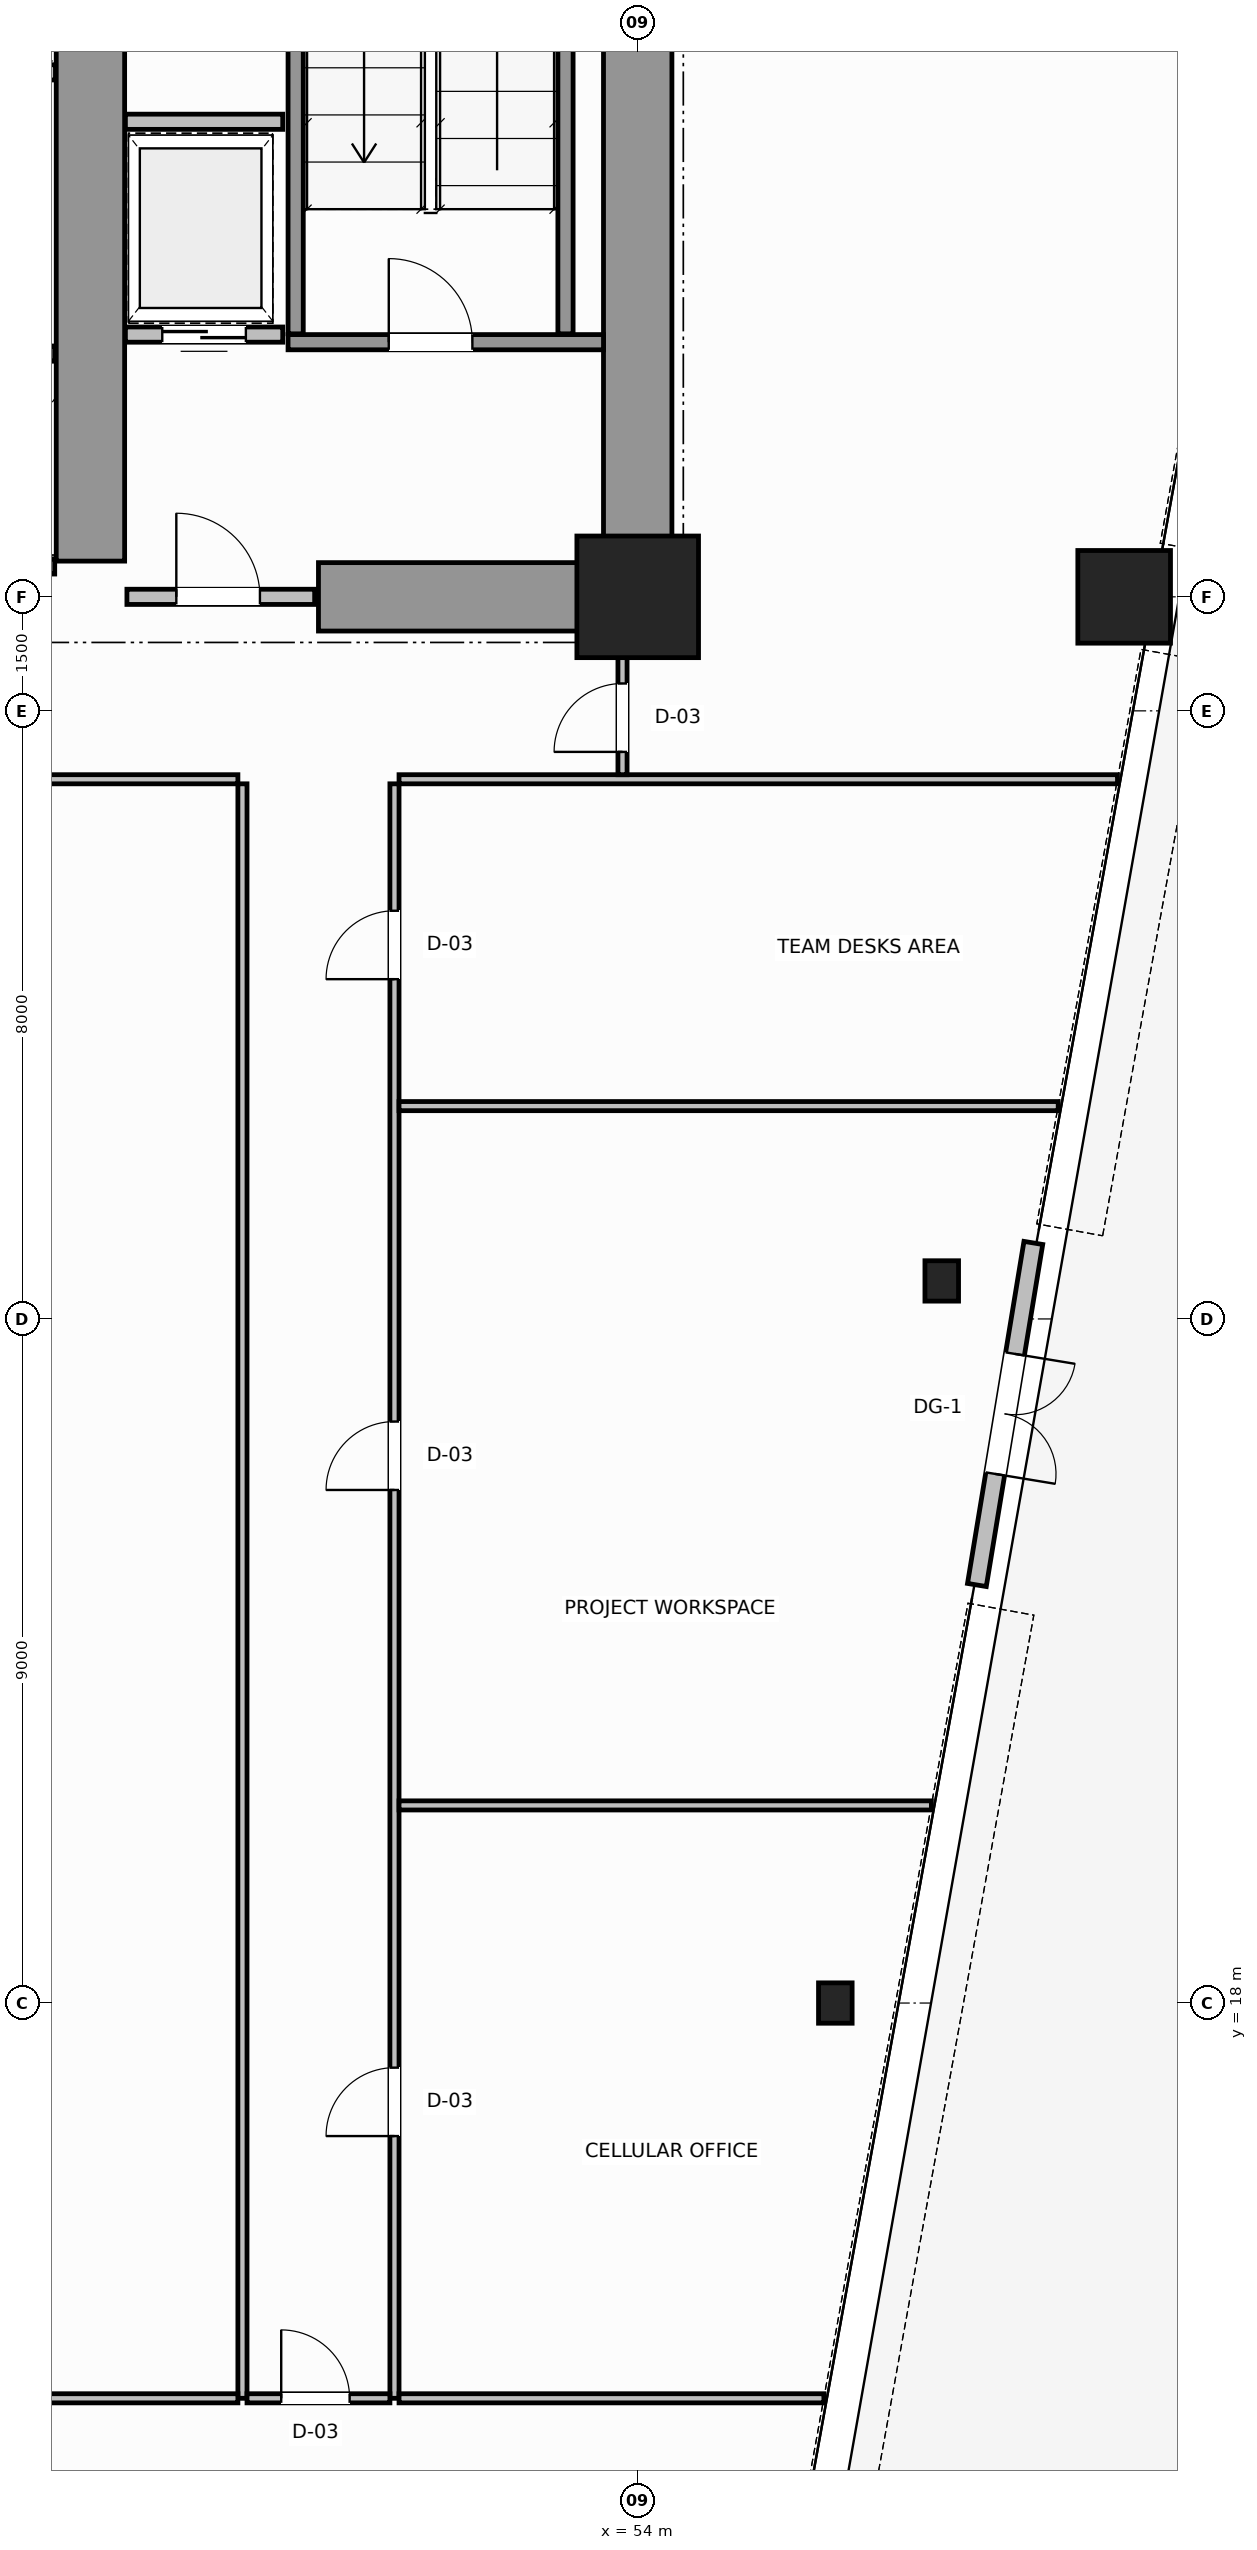
"""IFC4 building model, lengths in metres.
Left out: names, types, materials, properties, quantities, classifications, styles, units other than length and angle.
Written with IfcOpenShell. Run it as: python <this file> out.ifc"""

import sys

from ifc_helpers import new_model, si_unit, direction, frame, frame_2d, origin, origin_2d, place, context, subcontext, project, spatial, rectangle, hollow_circle, i_section, extrude, source, transform, mapped, element, fill, save


model = new_model("IFC4")
c1 = context("Model", 3, precision=1e-05, world=origin(), true_north=direction((0.0, 1.0)))
c2 = subcontext(c1, "Body", "Model", "MODEL_VIEW")
j1 = project(units=[si_unit("LENGTHUNIT", "METRE"), si_unit("PLANEANGLEUNIT", "RADIAN")], contexts=[c1])
p1 = place(None, origin())
s1 = spatial("IfcSite", under=j1, at=p1, CompositionType="ELEMENT")
p2 = place(p1, origin())
s2 = spatial("IfcBuilding", under=s1, at=p2, CompositionType="ELEMENT")
p3 = place(p2, frame((0.0, 0.0, 18.8)))
s3 = spatial("IfcBuildingStorey", under=s2, at=p3, CompositionType="ELEMENT", Elevation=18.8)
m1 = source(origin(), c2, "Body", "SweptSolid", [
    extrude(rectangle(XDim=1.6, YDim=1.6, at=origin_2d()), origin(), (0.0, 0.0, 1.0), 3.8),
])
p4 = place(p3, frame((54.0, 36.5, 0.0), z_axis=(0.0, 0.0, 1.0), x_axis=(1.0, 0.0, 0.0)))
e1 = element("IfcColumn", 1, at=p4, inside=s3, PredefinedType="COLUMN", context=c2, shape_type="MappedRepresentation", body=[
    mapped(m1, transform((0.0, 0.0, 0.0), scale=1.0)),
])
m2 = source(origin(), c2, "Body", "SweptSolid", [
    extrude(hollow_circle(Radius=0.61, WallThickness=0.05, at=origin_2d()), origin(), (0.0, 0.0, 1.0), 3.8),
])
p5 = place(p3, frame((60.4, 36.5, 0.0), z_axis=(0.0, 0.0, 1.0), x_axis=(1.0, 0.0, 0.0)))
e2 = element("IfcColumn", 2, at=p5, inside=s3, PredefinedType="COLUMN", context=c2, shape_type="MappedRepresentation", body=[
    mapped(m2, transform((0.0, 0.0, 0.0), scale=1.0)),
])
m3 = source(origin(), c2, "Body", "SweptSolid", [
    extrude(i_section(OverallWidth=0.442, OverallDepth=0.531, WebThickness=0.065, FlangeThickness=0.076, FilletRadius=0.015, at=origin_2d()), origin(), (0.0, 0.0, 1.0), 3.8),
])
for number, where, z_axis, x_axis in (
    (3, (58.0, 27.5, 0.0), (0.0, 0.0, 1.0), (1.0, 0.0, 0.0)),
    (4, (56.6, 18.0, 0.0), (0.0, 0.0, 1.0), (1.0, 0.0, 0.0)),
):
    element("IfcColumn", number, at=place(p3, frame(where, z_axis=z_axis, x_axis=x_axis)), inside=s3, PredefinedType="COLUMN", context=c2, shape_type="MappedRepresentation", body=[
        mapped(m3, transform((0.0, 0.0, 0.0), scale=1.0)),
    ])
p6 = place(p3, frame((54.0, 36.5, 0.0), z_axis=(0.0, 0.0, 1.0), x_axis=(0.0, 1.0, 0.0)))
e5 = element("IfcWall", 5, at=p6, inside=s3, PredefinedType="SHEAR", context=c2, shape_type="SweptSolid", body=[
    extrude(rectangle(XDim=14.5, YDim=0.9, at=frame_2d((7.25, 0.0))), origin(), (0.0, 0.0, 1.0), 3.8),
])
p7 = place(p3, frame((49.8, 36.5, 0.0), z_axis=(0.0, 0.0, 1.0), x_axis=(1.0, 0.0, 0.0)))
e6 = element("IfcWall", 6, at=p7, inside=s3, PredefinedType="SHEAR", context=c2, shape_type="SweptSolid", body=[
    extrude(rectangle(XDim=3.73, YDim=0.9, at=frame_2d((1.865, 0.0))), origin(), (0.0, 0.0, 1.0), 2.38),
])
p8 = place(p3, frame((46.8, 36.97, 0.0), z_axis=(0.0, 0.0, 1.0), x_axis=(0.0, 1.0, 0.0)))
e7 = element("IfcWall", 7, at=p8, inside=s3, PredefinedType="SHEAR", context=c2, shape_type="SweptSolid", body=[
    extrude(rectangle(XDim=9.23, YDim=0.9, at=frame_2d((4.615, 0.0))), origin(), (0.0, 0.0, 1.0), 3.8),
])
p9 = place(p3, frame((59.205, 28.0, 0.0), z_axis=(0.0, 0.0, 1.0), x_axis=(-0.162836302539, -0.98665309941, 0.0)))
e8 = element("IfcWall", 8, at=p9, inside=s3, PredefinedType="STANDARD", context=c2, shape_type="SweptSolid", body=[
    extrude(rectangle(XDim=4.561, YDim=0.25, at=frame_2d((2.28, 0.0))), origin(), (0.0, 0.0, 1.0), 3.58),
])
p10 = place(p9, frame((1.48, 0.0, 0.0)))
e9 = element("IfcOpeningElement", 9, at=p10, cuts=e8, PredefinedType="OPENING", context=c2, shape_type="SweptSolid", body=[
    extrude(rectangle(XDim=1.6, YDim=2.3, at=frame_2d((0.8, 1.15))), frame((0.0, 0.135, 0.0), z_axis=(0.0, -1.0, 0.0), x_axis=(1.0, 0.0, 0.0)), (0.0, 0.0, 1.0), 0.27),
])
p11 = place(p3, frame((49.4, 39.85, 0.0), z_axis=(0.0, 0.0, 1.0), x_axis=(1.0, 0.0, 0.0)))
e10 = element("IfcWall", 10, at=p11, inside=s3, PredefinedType="SOLIDWALL", context=c2, shape_type="SweptSolid", body=[
    extrude(rectangle(XDim=4.15, YDim=0.2, at=frame_2d((2.075, 0.0))), origin(), (0.0, 0.0, 1.0), 3.8),
])
p12 = place(p11, frame((1.325, 0.0, 0.0)))
e11 = element("IfcOpeningElement", 11, at=p12, cuts=e10, PredefinedType="OPENING", context=c2, shape_type="SweptSolid", body=[
    extrude(rectangle(XDim=1.1, YDim=2.15, at=frame_2d((0.55, 1.075))), frame((0.0, 0.11, 0.0), z_axis=(0.0, -1.0, 0.0), x_axis=(1.0, 0.0, 0.0)), (0.0, 0.0, 1.0), 0.22),
])
for number, where, z_axis, x_axis in (
    (12, (49.5, 39.96, 0.0), (0.0, 0.0, 1.0), (0.0, 1.0, 0.0)),
    (13, (53.05, 39.96, 0.0), (0.0, 0.0, 1.0), (0.0, 1.0, 0.0)),
):
    element("IfcWall", number, at=place(p3, frame(where, z_axis=z_axis, x_axis=x_axis)), inside=s3, PredefinedType="SOLIDWALL", context=c2, shape_type="SweptSolid", body=[
        extrude(rectangle(XDim=9.93, YDim=0.2, at=frame_2d((4.965, 0.0))), origin(), (0.0, 0.0, 1.0), 3.8),
    ])
p13 = place(p3, frame((47.28, 36.5, 0.0), z_axis=(0.0, 0.0, 1.0), x_axis=(1.0, 0.0, 0.0)))
e14 = element("IfcWall", 14, at=p13, inside=s3, PredefinedType="SOLIDWALL", context=c2, shape_type="SweptSolid", body=[
    extrude(rectangle(XDim=2.47, YDim=0.2, at=frame_2d((1.235, 0.0))), origin(), (0.0, 0.0, 1.0), 2.37),
])
p14 = place(p13, frame((0.65, 0.0, 0.0)))
e15 = element("IfcOpeningElement", 15, at=p14, cuts=e14, PredefinedType="OPENING", context=c2, shape_type="SweptSolid", body=[
    extrude(rectangle(XDim=1.1, YDim=2.15, at=frame_2d((0.55, 1.075))), frame((0.0, 0.11, 0.0), z_axis=(0.0, -1.0, 0.0), x_axis=(1.0, 0.0, 0.0)), (0.0, 0.0, 1.0), 0.22),
])
p15 = place(p3, frame((44.37, 39.7, 0.0), z_axis=(0.0, 0.0, 1.0), x_axis=(1.0, 0.0, 0.0)))
e16 = element("IfcWall", 16, at=p15, inside=s3, PredefinedType="SOLIDWALL", context=c2, shape_type="SweptSolid", body=[
    extrude(rectangle(XDim=1.96, YDim=0.2, at=frame_2d((0.98, 0.0))), origin(), (0.0, 0.0, 1.0), 3.58),
])
p16 = place(p3, frame((44.37, 36.9, 0.0), z_axis=(0.0, 0.0, 1.0), x_axis=(1.0, 0.0, 0.0)))
e17 = element("IfcWall", 17, at=p16, inside=s3, PredefinedType="SOLIDWALL", context=c2, shape_type="SweptSolid", body=[
    extrude(rectangle(XDim=1.96, YDim=0.2, at=frame_2d((0.98, 0.0))), origin(), (0.0, 0.0, 1.0), 2.37),
])
p17 = place(p3, frame((44.62, 43.4, 0.0), z_axis=(0.0, 0.0, 1.0), x_axis=(1.0, 0.0, 0.0)))
e18 = element("IfcWall", 18, at=p17, inside=s3, PredefinedType="SOLIDWALL", context=c2, shape_type="SweptSolid", body=[
    extrude(rectangle(XDim=1.72, YDim=0.2, at=frame_2d((0.86, 0.0))), origin(), (0.0, 0.0, 1.0), 3.58),
])
p18 = place(p3, frame((47.26, 39.95, 0.0), z_axis=(0.0, 0.0, 1.0), x_axis=(1.0, 0.0, 0.0)))
e19 = element("IfcWall", 19, at=p18, inside=s3, PredefinedType="SOLIDWALL", context=c2, shape_type="SweptSolid", body=[
    extrude(rectangle(XDim=2.07, YDim=0.2, at=frame_2d((1.035, 0.0))), origin(), (0.0, 0.0, 1.0), 3.58),
])
p19 = place(p18, frame((0.485, 0.0, 0.0)))
e20 = element("IfcOpeningElement", 20, at=p19, cuts=e19, PredefinedType="OPENING", context=c2, shape_type="SweptSolid", body=[
    extrude(rectangle(XDim=1.1, YDim=2.15, at=frame_2d((0.55, 1.075))), frame((0.0, 0.11, 0.0), z_axis=(0.0, -1.0, 0.0), x_axis=(1.0, 0.0, 0.0)), (0.0, 0.0, 1.0), 0.22),
])
p20 = place(p3, frame((47.26, 42.75, 0.0), z_axis=(0.0, 0.0, 1.0), x_axis=(1.0, 0.0, 0.0)))
e21 = element("IfcWall", 21, at=p20, inside=s3, PredefinedType="SOLIDWALL", context=c2, shape_type="SweptSolid", body=[
    extrude(rectangle(XDim=2.07, YDim=0.2, at=frame_2d((1.035, 0.0))), origin(), (0.0, 0.0, 1.0), 3.58),
])
p21 = place(p3, frame((19.26, 34.1, 0.0), z_axis=(0.0, 0.0, 1.0), x_axis=(1.0, 0.0, 0.0)))
e22 = element("IfcWall", 22, at=p21, inside=s3, PredefinedType="PARTITIONING", context=c2, shape_type="SweptSolid", body=[
    extrude(rectangle(XDim=29.48, YDim=0.12, at=frame_2d((14.74, 0.0))), origin(), (0.0, 0.0, 1.0), 3.58),
])
p22 = place(p21, frame((1.49, 0.0, 0.0)))
e23 = element("IfcOpeningElement", 23, at=p22, cuts=e22, PredefinedType="OPENING", context=c2, shape_type="SweptSolid", body=[
    extrude(rectangle(XDim=0.9, YDim=2.15, at=frame_2d((0.45, 1.075))), frame((0.0, 0.07, 0.0), z_axis=(0.0, -1.0, 0.0), x_axis=(1.0, 0.0, 0.0)), (0.0, 0.0, 1.0), 0.14),
])
p23 = place(p21, frame((9.79, 0.0, 0.0)))
e24 = element("IfcOpeningElement", 24, at=p23, cuts=e22, PredefinedType="OPENING", context=c2, shape_type="SweptSolid", body=[
    extrude(rectangle(XDim=0.9, YDim=2.15, at=frame_2d((0.45, 1.075))), frame((0.0, 0.07, 0.0), z_axis=(0.0, -1.0, 0.0), x_axis=(1.0, 0.0, 0.0)), (0.0, 0.0, 1.0), 0.14),
])
p24 = place(p21, frame((22.59, 0.0, 0.0)))
e25 = element("IfcOpeningElement", 25, at=p24, cuts=e22, PredefinedType="OPENING", context=c2, shape_type="SweptSolid", body=[
    extrude(rectangle(XDim=0.9, YDim=2.15, at=frame_2d((0.45, 1.075))), frame((0.0, 0.07, 0.0), z_axis=(0.0, -1.0, 0.0), x_axis=(1.0, 0.0, 0.0)), (0.0, 0.0, 1.0), 0.14),
])
p25 = place(p3, frame((50.86, 34.1, 0.0), z_axis=(0.0, 0.0, 1.0), x_axis=(1.0, 0.0, 0.0)))
e26 = element("IfcWall", 26, at=p25, inside=s3, PredefinedType="PARTITIONING", context=c2, shape_type="SweptSolid", body=[
    extrude(rectangle(XDim=9.452, YDim=0.12, at=frame_2d((4.726, 0.0))), origin(), (0.0, 0.0, 1.0), 3.58),
])
p26 = place(p3, frame((53.8, 34.16, 0.0), z_axis=(0.0, 0.0, 1.0), x_axis=(0.0, 1.0, 0.0)))
e27 = element("IfcWall", 27, at=p26, inside=s3, PredefinedType="PARTITIONING", context=c2, shape_type="SweptSolid", body=[
    extrude(rectangle(XDim=2.28, YDim=0.12, at=frame_2d((1.14, 0.0))), origin(), (0.0, 0.0, 1.0), 3.58),
])
p27 = place(p26, frame((0.3, 0.0, 0.0)))
e28 = element("IfcOpeningElement", 28, at=p27, cuts=e27, PredefinedType="OPENING", context=c2, shape_type="SweptSolid", body=[
    extrude(rectangle(XDim=0.9, YDim=2.15, at=frame_2d((0.45, 1.075))), frame((0.0, 0.07, 0.0), z_axis=(0.0, -1.0, 0.0), x_axis=(1.0, 0.0, 0.0)), (0.0, 0.0, 1.0), 0.14),
])
p28 = place(p3, frame((48.8, 12.8, 0.0), z_axis=(0.0, 0.0, 1.0), x_axis=(0.0, 1.0, 0.0)))
e29 = element("IfcWall", 29, at=p28, inside=s3, PredefinedType="PARTITIONING", context=c2, shape_type="SweptSolid", body=[
    extrude(rectangle(XDim=21.24, YDim=0.12, at=frame_2d((10.62, 0.0))), origin(), (0.0, 0.0, 1.0), 3.58),
])
p29 = place(p3, frame((50.8, 12.8, 0.0), z_axis=(0.0, 0.0, 1.0), x_axis=(0.0, 1.0, 0.0)))
e30 = element("IfcWall", 30, at=p29, inside=s3, PredefinedType="PARTITIONING", context=c2, shape_type="SweptSolid", body=[
    extrude(rectangle(XDim=21.24, YDim=0.12, at=frame_2d((10.62, 0.0))), origin(), (0.0, 0.0, 1.0), 3.58),
])
p30 = place(p29, frame((3.45, 0.0, 0.0)))
e31 = element("IfcOpeningElement", 31, at=p30, cuts=e30, PredefinedType="OPENING", context=c2, shape_type="SweptSolid", body=[
    extrude(rectangle(XDim=0.9, YDim=2.15, at=frame_2d((0.45, 1.075))), frame((0.0, 0.07, 0.0), z_axis=(0.0, -1.0, 0.0), x_axis=(1.0, 0.0, 0.0)), (0.0, 0.0, 1.0), 0.14),
])
p31 = place(p29, frame((11.95, 0.0, 0.0)))
e32 = element("IfcOpeningElement", 32, at=p31, cuts=e30, PredefinedType="OPENING", context=c2, shape_type="SweptSolid", body=[
    extrude(rectangle(XDim=0.9, YDim=2.15, at=frame_2d((0.45, 1.075))), frame((0.0, 0.07, 0.0), z_axis=(0.0, -1.0, 0.0), x_axis=(1.0, 0.0, 0.0)), (0.0, 0.0, 1.0), 0.14),
])
p32 = place(p29, frame((18.67, 0.0, 0.0)))
e33 = element("IfcOpeningElement", 33, at=p32, cuts=e30, PredefinedType="OPENING", context=c2, shape_type="SweptSolid", body=[
    extrude(rectangle(XDim=0.9, YDim=2.15, at=frame_2d((0.45, 1.075))), frame((0.0, 0.07, 0.0), z_axis=(0.0, -1.0, 0.0), x_axis=(1.0, 0.0, 0.0)), (0.0, 0.0, 1.0), 0.14),
])
p33 = place(p3, frame((48.86, 12.8, 0.0), z_axis=(0.0, 0.0, 1.0), x_axis=(1.0, 0.0, 0.0)))
e34 = element("IfcWall", 34, at=p33, inside=s3, PredefinedType="PARTITIONING", context=c2, shape_type="SweptSolid", body=[
    extrude(rectangle(XDim=1.88, YDim=0.12, at=frame_2d((0.94, 0.0))), origin(), (0.0, 0.0, 1.0), 3.58),
])
p34 = place(p33, frame((0.45, 0.0, 0.0)))
e35 = element("IfcOpeningElement", 35, at=p34, cuts=e34, PredefinedType="OPENING", context=c2, shape_type="SweptSolid", body=[
    extrude(rectangle(XDim=0.9, YDim=2.15, at=frame_2d((0.45, 1.075))), frame((0.0, 0.07, 0.0), z_axis=(0.0, -1.0, 0.0), x_axis=(1.0, 0.0, 0.0)), (0.0, 0.0, 1.0), 0.14),
])
p35 = place(p3, frame((50.86, 12.8, 0.0), z_axis=(0.0, 0.0, 1.0), x_axis=(1.0, 0.0, 0.0)))
e36 = element("IfcWall", 36, at=p35, inside=s3, PredefinedType="PARTITIONING", context=c2, shape_type="SweptSolid", body=[
    extrude(rectangle(XDim=5.589, YDim=0.12, at=frame_2d((2.794, 0.0))), origin(), (0.0, 0.0, 1.0), 3.58),
])
p36 = place(p3, frame((50.86, 20.6, 0.0), z_axis=(0.0, 0.0, 1.0), x_axis=(1.0, 0.0, 0.0)))
e37 = element("IfcWall", 37, at=p36, inside=s3, PredefinedType="PARTITIONING", context=c2, shape_type="SweptSolid", body=[
    extrude(rectangle(XDim=7.004, YDim=0.12, at=frame_2d((3.502, 0.0))), origin(), (0.0, 0.0, 1.0), 3.58),
])
p37 = place(p3, frame((50.86, 29.8, 0.0), z_axis=(0.0, 0.0, 1.0), x_axis=(1.0, 0.0, 0.0)))
e38 = element("IfcWall", 38, at=p37, inside=s3, PredefinedType="PARTITIONING", context=c2, shape_type="SweptSolid", body=[
    extrude(rectangle(XDim=8.672, YDim=0.12, at=frame_2d((4.336, 0.0))), origin(), (0.0, 0.0, 1.0), 3.58),
])
p38 = place(p3, frame((19.26, 12.8, 0.0), z_axis=(0.0, 0.0, 1.0), x_axis=(1.0, 0.0, 0.0)))
e39 = element("IfcWall", 39, at=p38, inside=s3, PredefinedType="PARTITIONING", context=c2, shape_type="SweptSolid", body=[
    extrude(rectangle(XDim=29.48, YDim=0.12, at=frame_2d((14.74, 0.0))), origin(), (0.0, 0.0, 1.0), 3.58),
])
m4 = source(origin(), c2, "Body", "SweptSolid", [
    extrude(rectangle(XDim=1.6, YDim=2.3, at=frame_2d((0.8, 1.15))), frame((0.0, 0.025, 0.0), z_axis=(0.0, -1.0, 0.0), x_axis=(1.0, 0.0, 0.0)), (0.0, 0.0, 1.0), 0.05),
])
p39 = place(p10, origin())
e40 = element("IfcDoor", 40, at=p39, inside=s3, OperationType="DOUBLE_DOOR_SINGLE_SWING", PredefinedType="DOOR", context=c2, shape_type="MappedRepresentation", body=[
    mapped(m4, transform((0.0, 0.0, 0.0), scale=1.0)),
])
fill(e9, e40)
m5 = source(origin(), c2, "Body", "SweptSolid", [
    extrude(rectangle(XDim=1.1, YDim=2.15, at=frame_2d((0.55, 1.075))), frame((0.0, 0.025, 0.0), z_axis=(0.0, -1.0, 0.0), x_axis=(1.0, 0.0, 0.0)), (0.0, 0.0, 1.0), 0.05),
])
p40 = place(p12, origin())
e41 = element("IfcDoor", 41, at=p40, inside=s3, OperationType="SINGLE_SWING_RIGHT", PredefinedType="DOOR", context=c2, shape_type="MappedRepresentation", body=[
    mapped(m5, transform((0.0, 0.0, 0.0), scale=1.0)),
])
fill(e11, e41)
p41 = place(p14, origin())
e42 = element("IfcDoor", 42, at=p41, inside=s3, OperationType="SINGLE_SWING_LEFT", PredefinedType="DOOR", context=c2, shape_type="MappedRepresentation", body=[
    mapped(m5, transform((0.0, 0.0, 0.0), scale=1.0)),
])
fill(e15, e42)
p42 = place(p19, origin())
e43 = element("IfcDoor", 43, at=p42, inside=s3, OperationType="DOUBLE_DOOR_SLIDING", PredefinedType="DOOR", context=c2, shape_type="MappedRepresentation", body=[
    mapped(m5, transform((0.0, 0.0, 0.0), scale=1.0)),
])
fill(e20, e43)
m6 = source(origin(), c2, "Body", "SweptSolid", [
    extrude(rectangle(XDim=0.9, YDim=2.15, at=frame_2d((0.45, 1.075))), frame((0.0, 0.025, 0.0), z_axis=(0.0, -1.0, 0.0), x_axis=(1.0, 0.0, 0.0)), (0.0, 0.0, 1.0), 0.05),
])
p43 = place(p27, origin())
e44 = element("IfcDoor", 44, at=p43, inside=s3, OperationType="SINGLE_SWING_RIGHT", PredefinedType="DOOR", context=c2, shape_type="MappedRepresentation", body=[
    mapped(m6, transform((0.0, 0.0, 0.0), scale=1.0)),
])
fill(e28, e44)
p44 = place(p30, origin())
e45 = element("IfcDoor", 45, at=p44, inside=s3, OperationType="SINGLE_SWING_RIGHT", PredefinedType="DOOR", context=c2, shape_type="MappedRepresentation", body=[
    mapped(m6, transform((0.0, 0.0, 0.0), scale=1.0)),
])
fill(e31, e45)
p45 = place(p31, origin())
e46 = element("IfcDoor", 46, at=p45, inside=s3, OperationType="SINGLE_SWING_LEFT", PredefinedType="DOOR", context=c2, shape_type="MappedRepresentation", body=[
    mapped(m6, transform((0.0, 0.0, 0.0), scale=1.0)),
])
fill(e32, e46)
p46 = place(p32, origin())
e47 = element("IfcDoor", 47, at=p46, inside=s3, OperationType="SINGLE_SWING_RIGHT", PredefinedType="DOOR", context=c2, shape_type="MappedRepresentation", body=[
    mapped(m6, transform((0.0, 0.0, 0.0), scale=1.0)),
])
fill(e33, e47)
p47 = place(p34, origin())
e48 = element("IfcDoor", 48, at=p47, inside=s3, OperationType="SINGLE_SWING_RIGHT", PredefinedType="DOOR", context=c2, shape_type="MappedRepresentation", body=[
    mapped(m6, transform((0.0, 0.0, 0.0), scale=1.0)),
])
fill(e35, e48)
save(model, sys.argv[1])
